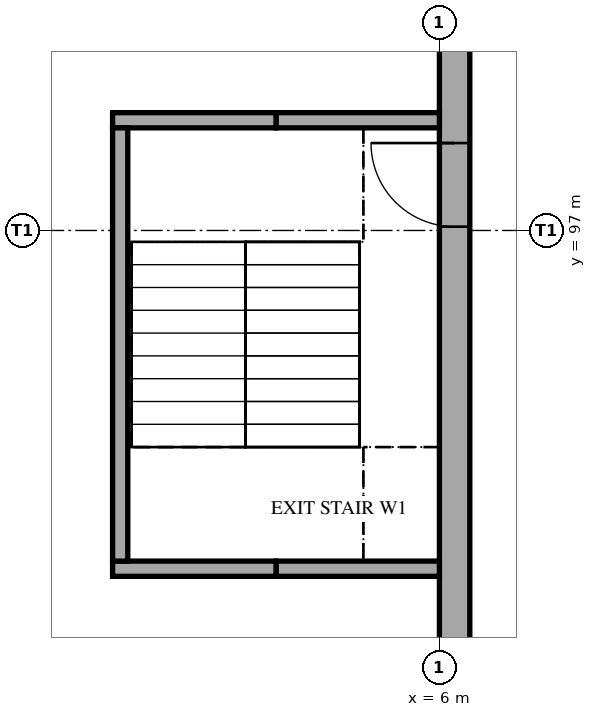
"""IFC4 building model, lengths in metres.
Left out: names, types, materials, properties, quantities, classifications, styles, units other than length and angle.
Written with IfcOpenShell. Run it as: python <this file> out.ifc"""

import sys

from ifc_helpers import new_model, si_unit, direction, frame, frame_2d, origin, place, context, subcontext, project, spatial, rectangle, extrude, element, fill, save


model = new_model("IFC4")
c1 = context("Model", 3, precision=1e-05, world=origin(), true_north=direction((0.0, 1.0)))
c2 = subcontext(c1, "Body", "Model", "MODEL_VIEW")
j1 = project(units=[si_unit("LENGTHUNIT", "METRE"), si_unit("PLANEANGLEUNIT", "RADIAN")], contexts=[c1])
p1 = place(None, origin())
s1 = spatial("IfcSite", under=j1, at=p1, CompositionType="ELEMENT")
p2 = place(p1, origin())
s2 = spatial("IfcBuilding", under=s1, at=p2, CompositionType="ELEMENT")
p3 = place(p2, frame((0.0, 0.0, -8.4)))
s3 = spatial("IfcBuildingStorey", under=s2, at=p3, CompositionType="ELEMENT", Elevation=-8.4)
p4 = place(p3, frame((6.2, 91.5, 0.0), z_axis=(0.0, 0.0, 1.0), x_axis=(0.0, 1.0, 0.0)))
e1 = element("IfcWall", 1, at=p4, inside=s3, PredefinedType="SOLIDWALL", context=c2, shape_type="SweptSolid", body=[
    extrude(rectangle(XDim=8.0, YDim=0.4, at=frame_2d((4.0, 0.0))), origin(), (0.0, 0.0, 1.0), 4.2),
])
p5 = place(p4, frame((5.55, 0.0, 0.0)))
e2 = element("IfcOpeningElement", 2, at=p5, cuts=e1, PredefinedType="OPENING", context=c2, shape_type="SweptSolid", body=[
    extrude(rectangle(XDim=1.1, YDim=2.1, at=frame_2d((0.55, 1.05))), frame((0.0, 0.21, 0.0), z_axis=(0.0, -1.0, 0.0), x_axis=(1.0, 0.0, 0.0)), (0.0, 0.0, 1.0), 0.42),
])
p6 = place(p3, frame((6.0, 98.45, 0.0), z_axis=(0.0, 0.0, 1.0), x_axis=(-1.0, 0.0, 0.0)))
e3 = element("IfcWall", 3, at=p6, inside=s3, PredefinedType="SOLIDWALL", context=c2, shape_type="SweptSolid", body=[
    extrude(rectangle(XDim=2.15, YDim=0.2, at=frame_2d((1.075, 0.0))), origin(), (0.0, 0.0, 1.0), 4.2),
])
p7 = place(p3, frame((3.85, 98.45, 0.0), z_axis=(0.0, 0.0, 1.0), x_axis=(-1.0, 0.0, 0.0)))
e4 = element("IfcWall", 4, at=p7, inside=s3, PredefinedType="SOLIDWALL", context=c2, shape_type="SweptSolid", body=[
    extrude(rectangle(XDim=2.15, YDim=0.2, at=frame_2d((1.075, 0.0))), origin(), (0.0, 0.0, 1.0), 4.2),
])
p8 = place(p3, frame((6.0, 92.55, 0.0), z_axis=(0.0, 0.0, 1.0), x_axis=(-1.0, 0.0, 0.0)))
e5 = element("IfcWall", 5, at=p8, inside=s3, PredefinedType="SOLIDWALL", context=c2, shape_type="SweptSolid", body=[
    extrude(rectangle(XDim=2.15, YDim=0.2, at=frame_2d((1.075, 0.0))), origin(), (0.0, 0.0, 1.0), 4.2),
])
p9 = place(p3, frame((3.85, 92.55, 0.0), z_axis=(0.0, 0.0, 1.0), x_axis=(-1.0, 0.0, 0.0)))
e6 = element("IfcWall", 6, at=p9, inside=s3, PredefinedType="SOLIDWALL", context=c2, shape_type="SweptSolid", body=[
    extrude(rectangle(XDim=2.15, YDim=0.2, at=frame_2d((1.075, 0.0))), origin(), (0.0, 0.0, 1.0), 4.2),
])
p10 = place(p3, frame((1.8, 98.35, 0.0), z_axis=(0.0, 0.0, 1.0), x_axis=(0.0, -1.0, 0.0)))
e7 = element("IfcWall", 7, at=p10, inside=s3, PredefinedType="SOLIDWALL", context=c2, shape_type="SweptSolid", body=[
    extrude(rectangle(XDim=5.7, YDim=0.2, at=frame_2d((2.85, 0.0))), origin(), (0.0, 0.0, 1.0), 4.2),
])
p11 = place(p5, origin())
e8 = element("IfcDoor", 8, at=p11, inside=s3, OperationType="SINGLE_SWING_RIGHT", PredefinedType="DOOR", context=c2, shape_type="SweptSolid", body=[
    extrude(rectangle(XDim=1.1, YDim=2.1, at=frame_2d((0.55, 1.05))), frame((0.0, 0.025, 0.0), z_axis=(0.0, -1.0, 0.0), x_axis=(1.0, 0.0, 0.0)), (0.0, 0.0, 1.0), 0.05),
])
fill(e2, e8)
save(model, sys.argv[1])
